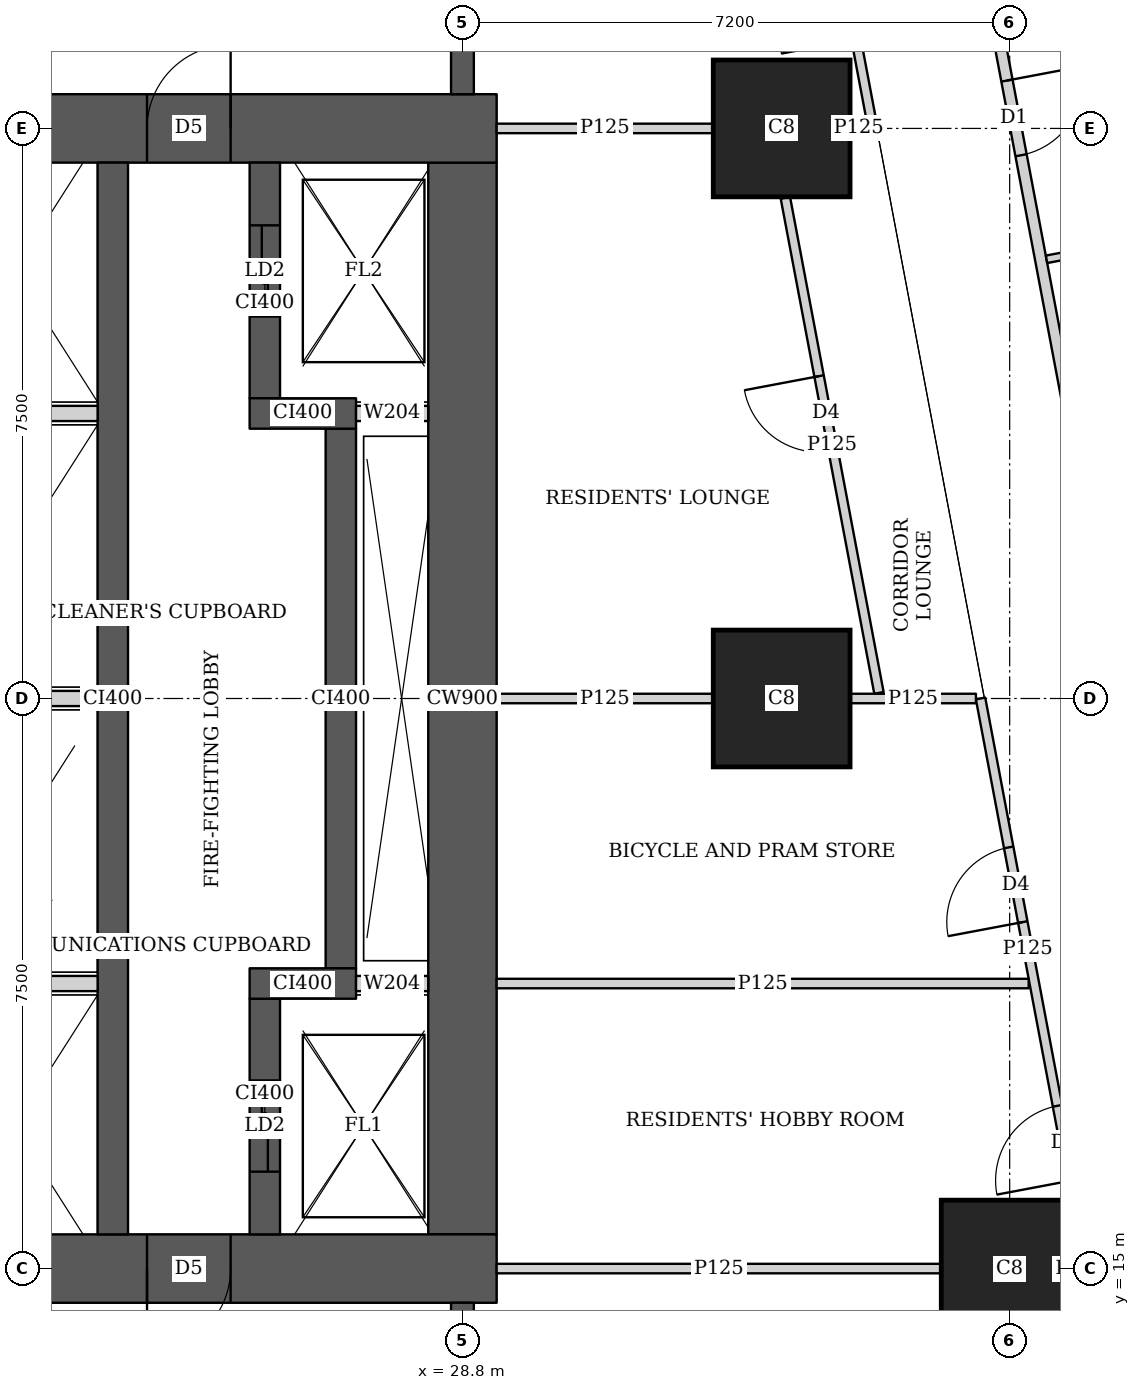
"""IFC4 building model, lengths in metres.
Left out: names, types, materials, properties, quantities, classifications, styles, units other than length and angle.
Written with IfcOpenShell. Run it as: python <this file> out.ifc"""

import sys

from ifc_helpers import new_model, si_unit, direction, frame, frame_2d, origin, origin_2d, place, context, subcontext, project, spatial, rectangle, extrude, element, fill, save


model = new_model("IFC4")
c1 = context("Model", 3, precision=1e-05, world=origin(), true_north=direction((0.0, 1.0)))
c2 = subcontext(c1, "Body", "Model", "MODEL_VIEW")
j1 = project(units=[si_unit("LENGTHUNIT", "METRE"), si_unit("PLANEANGLEUNIT", "RADIAN")], contexts=[c1])
p1 = place(None, origin())
s1 = spatial("IfcSite", under=j1, at=p1, CompositionType="ELEMENT")
p2 = place(p1, origin())
s2 = spatial("IfcBuilding", under=s1, at=p2, CompositionType="ELEMENT")
p3 = place(p2, frame((0.0, 0.0, 20.0)))
s3 = spatial("IfcBuildingStorey", under=s2, at=p3, CompositionType="ELEMENT", Elevation=20.0)
for number, where, z_axis, x_axis in (
    (1, (36.0, 15.0, 0.0), (0.0, 0.0, 1.0), (1.0, 0.0, 0.0)),
    (2, (33.0, 22.5, 0.0), (0.0, 0.0, 1.0), (1.0, 0.0, 0.0)),
    (3, (33.0, 30.0, 0.0), (0.0, 0.0, 1.0), (1.0, 0.0, 0.0)),
):
    element("IfcColumn", number, at=place(p3, frame(where, z_axis=z_axis, x_axis=x_axis)), inside=s3, PredefinedType="COLUMN", context=c2, shape_type="SweptSolid", body=[
        extrude(rectangle(XDim=1.8, YDim=1.8, at=origin_2d()), origin(), (0.0, 0.0, 1.0), 3.75),
    ])
p4 = place(p3, frame((13.95, 15.0, 0.0), z_axis=(0.0, 0.0, 1.0), x_axis=(1.0, 0.0, 0.0)))
e4 = element("IfcWall", 4, at=p4, inside=s3, PredefinedType="SHEAR", context=c2, shape_type="SweptSolid", body=[
    extrude(rectangle(XDim=15.3, YDim=0.9, at=frame_2d((7.65, 0.0))), origin(), (0.0, 0.0, 1.0), 3.75),
])
p5 = place(p4, frame((4.45, 0.0, 0.0)))
e5 = element("IfcOpeningElement", 5, at=p5, cuts=e4, PredefinedType="OPENING", context=c2, shape_type="SweptSolid", body=[
    extrude(rectangle(XDim=1.8, YDim=2.1, at=frame_2d((0.9, 1.05))), frame((0.0, 0.46, 0.0), z_axis=(0.0, -1.0, 0.0), x_axis=(1.0, 0.0, 0.0)), (0.0, 0.0, 1.0), 0.92),
])
p6 = place(p4, frame((10.7, 0.0, 0.0)))
e6 = element("IfcOpeningElement", 6, at=p6, cuts=e4, PredefinedType="OPENING", context=c2, shape_type="SweptSolid", body=[
    extrude(rectangle(XDim=1.1, YDim=2.1, at=frame_2d((0.55, 1.05))), frame((0.0, 0.46, 0.0), z_axis=(0.0, -1.0, 0.0), x_axis=(1.0, 0.0, 0.0)), (0.0, 0.0, 1.0), 0.92),
])
p7 = place(p3, frame((13.95, 30.0, 0.0), z_axis=(0.0, 0.0, 1.0), x_axis=(1.0, 0.0, 0.0)))
e7 = element("IfcWall", 7, at=p7, inside=s3, PredefinedType="SHEAR", context=c2, shape_type="SweptSolid", body=[
    extrude(rectangle(XDim=15.3, YDim=0.9, at=frame_2d((7.65, 0.0))), origin(), (0.0, 0.0, 1.0), 3.75),
])
p8 = place(p7, frame((4.45, 0.0, 0.0)))
e8 = element("IfcOpeningElement", 8, at=p8, cuts=e7, PredefinedType="OPENING", context=c2, shape_type="SweptSolid", body=[
    extrude(rectangle(XDim=1.8, YDim=2.1, at=frame_2d((0.9, 1.05))), frame((0.0, 0.46, 0.0), z_axis=(0.0, -1.0, 0.0), x_axis=(1.0, 0.0, 0.0)), (0.0, 0.0, 1.0), 0.92),
])
p9 = place(p7, frame((10.7, 0.0, 0.0)))
e9 = element("IfcOpeningElement", 9, at=p9, cuts=e7, PredefinedType="OPENING", context=c2, shape_type="SweptSolid", body=[
    extrude(rectangle(XDim=1.1, YDim=2.1, at=frame_2d((0.55, 1.05))), frame((0.0, 0.46, 0.0), z_axis=(0.0, -1.0, 0.0), x_axis=(1.0, 0.0, 0.0)), (0.0, 0.0, 1.0), 0.92),
])
p10 = place(p3, frame((28.8, 15.45, 0.0), z_axis=(0.0, 0.0, 1.0), x_axis=(0.0, 1.0, 0.0)))
e10 = element("IfcWall", 10, at=p10, inside=s3, PredefinedType="SHEAR", context=c2, shape_type="SweptSolid", body=[
    extrude(rectangle(XDim=14.1, YDim=0.9, at=frame_2d((7.05, 0.0))), origin(), (0.0, 0.0, 1.0), 3.75),
])
p11 = place(p3, frame((24.2, 15.45, 0.0), z_axis=(0.0, 0.0, 1.0), x_axis=(0.0, 1.0, 0.0)))
e11 = element("IfcWall", 11, at=p11, inside=s3, PredefinedType="SHEAR", context=c2, shape_type="SweptSolid", body=[
    extrude(rectangle(XDim=14.1, YDim=0.4, at=frame_2d((7.05, 0.0))), origin(), (0.0, 0.0, 1.0), 3.75),
])
p12 = place(p3, frame((26.2, 15.45, 0.0), z_axis=(0.0, 0.0, 1.0), x_axis=(0.0, 1.0, 0.0)))
e12 = element("IfcWall", 12, at=p12, inside=s3, PredefinedType="SHEAR", context=c2, shape_type="SweptSolid", body=[
    extrude(rectangle(XDim=3.1, YDim=0.4, at=frame_2d((1.55, 0.0))), origin(), (0.0, 0.0, 1.0), 3.75),
])
p13 = place(p12, frame((0.825, 0.0, 0.0)))
e13 = element("IfcOpeningElement", 13, at=p13, cuts=e12, PredefinedType="OPENING", context=c2, shape_type="SweptSolid", body=[
    extrude(rectangle(XDim=1.2, YDim=2.1, at=frame_2d((0.6, 1.05))), frame((0.0, 0.21, 0.0), z_axis=(0.0, -1.0, 0.0), x_axis=(1.0, 0.0, 0.0)), (0.0, 0.0, 1.0), 0.42),
])
p14 = place(p3, frame((26.0, 18.75, 0.0), z_axis=(0.0, 0.0, 1.0), x_axis=(1.0, 0.0, 0.0)))
e14 = element("IfcWall", 14, at=p14, inside=s3, PredefinedType="SHEAR", context=c2, shape_type="SweptSolid", body=[
    extrude(rectangle(XDim=1.4, YDim=0.4, at=frame_2d((0.7, 0.0))), origin(), (0.0, 0.0, 1.0), 3.75),
])
p15 = place(p3, frame((27.2, 18.95, 0.0), z_axis=(0.0, 0.0, 1.0), x_axis=(0.0, 1.0, 0.0)))
e15 = element("IfcWall", 15, at=p15, inside=s3, PredefinedType="SHEAR", context=c2, shape_type="SweptSolid", body=[
    extrude(rectangle(XDim=7.1, YDim=0.4, at=frame_2d((3.55, 0.0))), origin(), (0.0, 0.0, 1.0), 3.75),
])
p16 = place(p3, frame((26.0, 26.25, 0.0), z_axis=(0.0, 0.0, 1.0), x_axis=(1.0, 0.0, 0.0)))
e16 = element("IfcWall", 16, at=p16, inside=s3, PredefinedType="SHEAR", context=c2, shape_type="SweptSolid", body=[
    extrude(rectangle(XDim=1.4, YDim=0.4, at=frame_2d((0.7, 0.0))), origin(), (0.0, 0.0, 1.0), 3.75),
])
p17 = place(p3, frame((26.2, 26.45, 0.0), z_axis=(0.0, 0.0, 1.0), x_axis=(0.0, 1.0, 0.0)))
e17 = element("IfcWall", 17, at=p17, inside=s3, PredefinedType="SHEAR", context=c2, shape_type="SweptSolid", body=[
    extrude(rectangle(XDim=3.1, YDim=0.4, at=frame_2d((1.55, 0.0))), origin(), (0.0, 0.0, 1.0), 3.75),
])
p18 = place(p17, frame((1.075, 0.0, 0.0)))
e18 = element("IfcOpeningElement", 18, at=p18, cuts=e17, PredefinedType="OPENING", context=c2, shape_type="SweptSolid", body=[
    extrude(rectangle(XDim=1.2, YDim=2.1, at=frame_2d((0.6, 1.05))), frame((0.0, 0.21, 0.0), z_axis=(0.0, -1.0, 0.0), x_axis=(1.0, 0.0, 0.0)), (0.0, 0.0, 1.0), 0.42),
])
for number, where, z_axis, x_axis in (
    (19, (28.8, 10.35, 0.0), (0.0, 0.0, 1.0), (0.0, 1.0, 0.0)),
    (20, (28.8, 30.45, 0.0), (0.0, 0.0, 1.0), (0.0, 1.0, 0.0)),
):
    element("IfcWall", number, at=place(p3, frame(where, z_axis=z_axis, x_axis=x_axis)), inside=s3, PredefinedType="SHEAR", context=c2, shape_type="SweptSolid", body=[
        extrude(rectangle(XDim=4.2, YDim=0.3, at=frame_2d((2.1, 0.0))), origin(), (0.0, 0.0, 1.0), 3.75),
    ])
p19 = place(p3, frame((33.755, 42.325, 0.0), z_axis=(0.0, 0.0, 1.0), x_axis=(0.185611461091, -0.982623216453, 0.0)))
e21 = element("IfcWall", 21, at=p19, inside=s3, PredefinedType="SOLIDWALL", context=c2, shape_type="SweptSolid", body=[
    extrude(rectangle(XDim=40.241, YDim=0.15, at=frame_2d((20.121, 0.0))), origin(), (0.0, 0.0, 1.0), 2.5),
])
p20 = place(p19, frame((7.325, 0.0, 0.0)))
e22 = element("IfcOpeningElement", 22, at=p20, cuts=e21, PredefinedType="OPENING", context=c2, shape_type="SweptSolid", body=[
    extrude(rectangle(XDim=1.0, YDim=2.1, at=frame_2d((0.5, 1.05))), frame((0.0, 0.085, 0.0), z_axis=(0.0, -1.0, 0.0), x_axis=(1.0, 0.0, 0.0)), (0.0, 0.0, 1.0), 0.17),
])
p21 = place(p19, frame((11.902, 0.0, 0.0)))
e23 = element("IfcOpeningElement", 23, at=p21, cuts=e21, PredefinedType="OPENING", context=c2, shape_type="SweptSolid", body=[
    extrude(rectangle(XDim=1.0, YDim=2.1, at=frame_2d((0.5, 1.05))), frame((0.0, 0.085, 0.0), z_axis=(0.0, -1.0, 0.0), x_axis=(1.0, 0.0, 0.0)), (0.0, 0.0, 1.0), 0.17),
])
p22 = place(p19, frame((25.718, 0.0, 0.0)))
e24 = element("IfcOpeningElement", 24, at=p22, cuts=e21, PredefinedType="OPENING", context=c2, shape_type="SweptSolid", body=[
    extrude(rectangle(XDim=1.0, YDim=2.1, at=frame_2d((0.5, 1.05))), frame((0.0, 0.085, 0.0), z_axis=(0.0, -1.0, 0.0), x_axis=(1.0, 0.0, 0.0)), (0.0, 0.0, 1.0), 0.17),
])
p23 = place(p19, frame((31.788, 0.0, 0.0)))
e25 = element("IfcOpeningElement", 25, at=p23, cuts=e21, PredefinedType="OPENING", context=c2, shape_type="SweptSolid", body=[
    extrude(rectangle(XDim=1.0, YDim=2.1, at=frame_2d((0.5, 1.05))), frame((0.0, 0.085, 0.0), z_axis=(0.0, -1.0, 0.0), x_axis=(1.0, 0.0, 0.0)), (0.0, 0.0, 1.0), 0.17),
])
p24 = place(p3, frame((39.948, 28.933, 0.0), z_axis=(0.0, 0.0, 1.0), x_axis=(-0.982576058723, -0.185860939478, 0.0)))
e26 = element("IfcWall", 26, at=p24, inside=s3, PredefinedType="PARTITIONING", context=c2, shape_type="SweptSolid", body=[
    extrude(rectangle(XDim=3.524, YDim=0.1, at=frame_2d((1.762, 0.0))), origin(), (0.0, 0.0, 1.0), 3.5),
])
p25 = place(p3, frame((36.861, 15.913, 0.0), z_axis=(0.0, 0.0, 1.0), x_axis=(-0.185598960122, 0.982625577726, 0.0)))
e27 = element("IfcWall", 27, at=p25, inside=s3, PredefinedType="PARTITIONING", context=c2, shape_type="SweptSolid", body=[
    extrude(rectangle(XDim=6.703, YDim=0.125, at=frame_2d((3.352, 0.0))), origin(), (0.0, 0.0, 1.0), 2.5),
])
p26 = place(p25, frame((0.25, 0.0, 0.0)))
e28 = element("IfcOpeningElement", 28, at=p26, cuts=e27, PredefinedType="OPENING", context=c2, shape_type="SweptSolid", body=[
    extrude(rectangle(XDim=1.0, YDim=2.1, at=frame_2d((0.5, 1.05))), frame((0.0, 0.073, 0.0), z_axis=(0.0, -1.0, 0.0), x_axis=(1.0, 0.0, 0.0)), (0.0, 0.0, 1.0), 0.145),
])
p27 = place(p25, frame((3.71, 0.0, 0.0)))
e29 = element("IfcOpeningElement", 29, at=p27, cuts=e27, PredefinedType="OPENING", context=c2, shape_type="SweptSolid", body=[
    extrude(rectangle(XDim=1.0, YDim=2.1, at=frame_2d((0.5, 1.05))), frame((0.0, 0.073, 0.0), z_axis=(0.0, -1.0, 0.0), x_axis=(1.0, 0.0, 0.0)), (0.0, 0.0, 1.0), 0.145),
])
p28 = place(p3, frame((34.193, 30.04, 0.0), z_axis=(0.0, 0.0, 1.0), x_axis=(-0.185626015863, 0.982620467034, 0.0)))
e30 = element("IfcWall", 30, at=p28, inside=s3, PredefinedType="PARTITIONING", context=c2, shape_type="SweptSolid", body=[
    extrude(rectangle(XDim=4.628, YDim=0.125, at=frame_2d((2.314, 0.0))), origin(), (0.0, 0.0, 1.0), 2.5),
])
p29 = place(p28, frame((1.15, 0.0, 0.0)))
e31 = element("IfcOpeningElement", 31, at=p29, cuts=e30, PredefinedType="OPENING", context=c2, shape_type="SweptSolid", body=[
    extrude(rectangle(XDim=1.0, YDim=2.1, at=frame_2d((0.5, 1.05))), frame((0.0, 0.073, 0.0), z_axis=(0.0, -1.0, 0.0), x_axis=(1.0, 0.0, 0.0)), (0.0, 0.0, 1.0), 0.145),
])
p30 = place(p3, frame((34.28, 22.574, 0.0), z_axis=(0.0, 0.0, 1.0), x_axis=(-0.185713862218, 0.982603867986, 0.0)))
e32 = element("IfcWall", 32, at=p30, inside=s3, PredefinedType="PARTITIONING", context=c2, shape_type="SweptSolid", body=[
    extrude(rectangle(XDim=6.628, YDim=0.125, at=frame_2d((3.314, 0.0))), origin(), (0.0, 0.0, 1.0), 2.5),
])
p31 = place(p30, frame((3.241, 0.0, 0.0)))
e33 = element("IfcOpeningElement", 33, at=p31, cuts=e32, PredefinedType="OPENING", context=c2, shape_type="SweptSolid", body=[
    extrude(rectangle(XDim=1.0, YDim=2.1, at=frame_2d((0.5, 1.05))), frame((0.0, 0.073, 0.0), z_axis=(0.0, -1.0, 0.0), x_axis=(1.0, 0.0, 0.0)), (0.0, 0.0, 1.0), 0.145),
])
p32 = place(p3, frame((29.25, 15.0, 0.0), z_axis=(0.0, 0.0, 1.0), x_axis=(1.0, 0.0, 0.0)))
e34 = element("IfcWall", 34, at=p32, inside=s3, PredefinedType="PARTITIONING", context=c2, shape_type="SweptSolid", body=[
    extrude(rectangle(XDim=5.849, YDim=0.125, at=frame_2d((2.925, 0.0))), origin(), (0.0, 0.0, 1.0), 3.5),
])
p33 = place(p3, frame((29.25, 18.75, 0.0), z_axis=(0.0, 0.0, 1.0), x_axis=(1.0, 0.0, 0.0)))
e35 = element("IfcWall", 35, at=p33, inside=s3, PredefinedType="PARTITIONING", context=c2, shape_type="SweptSolid", body=[
    extrude(rectangle(XDim=7.0, YDim=0.125, at=frame_2d((3.5, 0.0))), origin(), (0.0, 0.0, 1.0), 3.5),
])
p34 = place(p3, frame((29.25, 22.5, 0.0), z_axis=(0.0, 0.0, 1.0), x_axis=(1.0, 0.0, 0.0)))
e36 = element("IfcWall", 36, at=p34, inside=s3, PredefinedType="PARTITIONING", context=c2, shape_type="SweptSolid", body=[
    extrude(rectangle(XDim=2.849, YDim=0.125, at=frame_2d((1.425, 0.0))), origin(), (0.0, 0.0, 1.0), 3.5),
])
p35 = place(p3, frame((33.901, 22.5, 0.0), z_axis=(0.0, 0.0, 1.0), x_axis=(1.0, 0.0, 0.0)))
e37 = element("IfcWall", 37, at=p35, inside=s3, PredefinedType="PARTITIONING", context=c2, shape_type="SweptSolid", body=[
    extrude(rectangle(XDim=1.655, YDim=0.125, at=frame_2d((0.828, 0.0))), origin(), (0.0, 0.0, 1.0), 2.5),
])
p36 = place(p3, frame((29.25, 30.0, 0.0), z_axis=(0.0, 0.0, 1.0), x_axis=(1.0, 0.0, 0.0)))
e38 = element("IfcWall", 38, at=p36, inside=s3, PredefinedType="PARTITIONING", context=c2, shape_type="SweptSolid", body=[
    extrude(rectangle(XDim=2.849, YDim=0.125, at=frame_2d((1.425, 0.0))), origin(), (0.0, 0.0, 1.0), 3.5),
])
p37 = place(p3, frame((33.901, 30.0, 0.0), z_axis=(0.0, 0.0, 1.0), x_axis=(1.0, 0.0, 0.0)))
e39 = element("IfcWall", 39, at=p37, inside=s3, PredefinedType="PARTITIONING", context=c2, shape_type="SweptSolid", body=[
    extrude(rectangle(XDim=0.224, YDim=0.125, at=frame_2d((0.112, 0.0))), origin(), (0.0, 0.0, 1.0), 2.5),
])
for number, where, z_axis, x_axis in (
    (40, (21.8, 18.75, 0.0), (0.0, 0.0, 1.0), (1.0, 0.0, 0.0)),
    (41, (21.8, 22.5, 0.0), (0.0, 0.0, 1.0), (1.0, 0.0, 0.0)),
    (42, (21.8, 26.25, 0.0), (0.0, 0.0, 1.0), (1.0, 0.0, 0.0)),
):
    element("IfcWall", number, at=place(p3, frame(where, z_axis=z_axis, x_axis=x_axis)), inside=s3, PredefinedType="SOLIDWALL", context=c2, shape_type="SweptSolid", body=[
        extrude(rectangle(XDim=2.2, YDim=0.2, at=frame_2d((1.1, 0.0))), origin(), (0.0, 0.0, 1.0), 3.5),
    ])
for number, where, z_axis, x_axis in (
    (43, (27.4, 18.75, 0.0), (0.0, 0.0, 1.0), (1.0, 0.0, 0.0)),
    (44, (27.4, 26.25, 0.0), (0.0, 0.0, 1.0), (1.0, 0.0, 0.0)),
):
    element("IfcWall", number, at=place(p3, frame(where, z_axis=z_axis, x_axis=x_axis)), inside=s3, PredefinedType="SOLIDWALL", context=c2, shape_type="SweptSolid", body=[
        extrude(rectangle(XDim=0.95, YDim=0.2, at=frame_2d((0.475, 0.0))), origin(), (0.0, 0.0, 1.0), 3.5),
    ])
p38 = place(p21, origin())
e45 = element("IfcDoor", 45, at=p38, inside=s3, OperationType="SINGLE_SWING_LEFT", PredefinedType="DOOR", context=c2, shape_type="SweptSolid", body=[
    extrude(rectangle(XDim=1.0, YDim=2.1, at=frame_2d((0.5, 1.05))), frame((0.0, 0.025, 0.0), z_axis=(0.0, -1.0, 0.0), x_axis=(1.0, 0.0, 0.0)), (0.0, 0.0, 1.0), 0.05),
])
fill(e23, e45)
p39 = place(p26, origin())
e46 = element("IfcDoor", 46, at=p39, inside=s3, OperationType="SINGLE_SWING_LEFT", PredefinedType="DOOR", context=c2, shape_type="SweptSolid", body=[
    extrude(rectangle(XDim=1.0, YDim=2.1, at=frame_2d((0.5, 1.05))), frame((0.0, 0.025, 0.0), z_axis=(0.0, -1.0, 0.0), x_axis=(1.0, 0.0, 0.0)), (0.0, 0.0, 1.0), 0.05),
])
fill(e28, e46)
p40 = place(p27, origin())
e47 = element("IfcDoor", 47, at=p40, inside=s3, OperationType="SINGLE_SWING_LEFT", PredefinedType="DOOR", context=c2, shape_type="SweptSolid", body=[
    extrude(rectangle(XDim=1.0, YDim=2.1, at=frame_2d((0.5, 1.05))), frame((0.0, 0.025, 0.0), z_axis=(0.0, -1.0, 0.0), x_axis=(1.0, 0.0, 0.0)), (0.0, 0.0, 1.0), 0.05),
])
fill(e29, e47)
p41 = place(p31, origin())
e48 = element("IfcDoor", 48, at=p41, inside=s3, OperationType="SINGLE_SWING_RIGHT", PredefinedType="DOOR", context=c2, shape_type="SweptSolid", body=[
    extrude(rectangle(XDim=1.0, YDim=2.1, at=frame_2d((0.5, 1.05))), frame((0.0, 0.025, 0.0), z_axis=(0.0, -1.0, 0.0), x_axis=(1.0, 0.0, 0.0)), (0.0, 0.0, 1.0), 0.05),
])
fill(e33, e48)
p42 = place(p6, origin())
e49 = element("IfcDoor", 49, at=p42, inside=s3, OperationType="SINGLE_SWING_RIGHT", PredefinedType="DOOR", context=c2, shape_type="SweptSolid", body=[
    extrude(rectangle(XDim=1.1, YDim=2.1, at=frame_2d((0.55, 1.05))), frame((0.0, 0.025, 0.0), z_axis=(0.0, -1.0, 0.0), x_axis=(1.0, 0.0, 0.0)), (0.0, 0.0, 1.0), 0.05),
])
fill(e6, e49)
p43 = place(p9, origin())
e50 = element("IfcDoor", 50, at=p43, inside=s3, OperationType="SINGLE_SWING_RIGHT", PredefinedType="DOOR", context=c2, shape_type="SweptSolid", body=[
    extrude(rectangle(XDim=1.1, YDim=2.1, at=frame_2d((0.55, 1.05))), frame((0.0, 0.025, 0.0), z_axis=(0.0, -1.0, 0.0), x_axis=(1.0, 0.0, 0.0)), (0.0, 0.0, 1.0), 0.05),
])
fill(e9, e50)
p44 = place(p13, origin())
e51 = element("IfcDoor", 51, at=p44, inside=s3, OperationType="DOUBLE_DOOR_SLIDING", PredefinedType="DOOR", context=c2, shape_type="SweptSolid", body=[
    extrude(rectangle(XDim=1.2, YDim=2.1, at=frame_2d((0.6, 1.05))), frame((0.0, 0.025, 0.0), z_axis=(0.0, -1.0, 0.0), x_axis=(1.0, 0.0, 0.0)), (0.0, 0.0, 1.0), 0.05),
])
fill(e13, e51)
p45 = place(p18, origin())
e52 = element("IfcDoor", 52, at=p45, inside=s3, OperationType="DOUBLE_DOOR_SLIDING", PredefinedType="DOOR", context=c2, shape_type="SweptSolid", body=[
    extrude(rectangle(XDim=1.2, YDim=2.1, at=frame_2d((0.6, 1.05))), frame((0.0, 0.025, 0.0), z_axis=(0.0, -1.0, 0.0), x_axis=(1.0, 0.0, 0.0)), (0.0, 0.0, 1.0), 0.05),
])
fill(e18, e52)
save(model, sys.argv[1])
